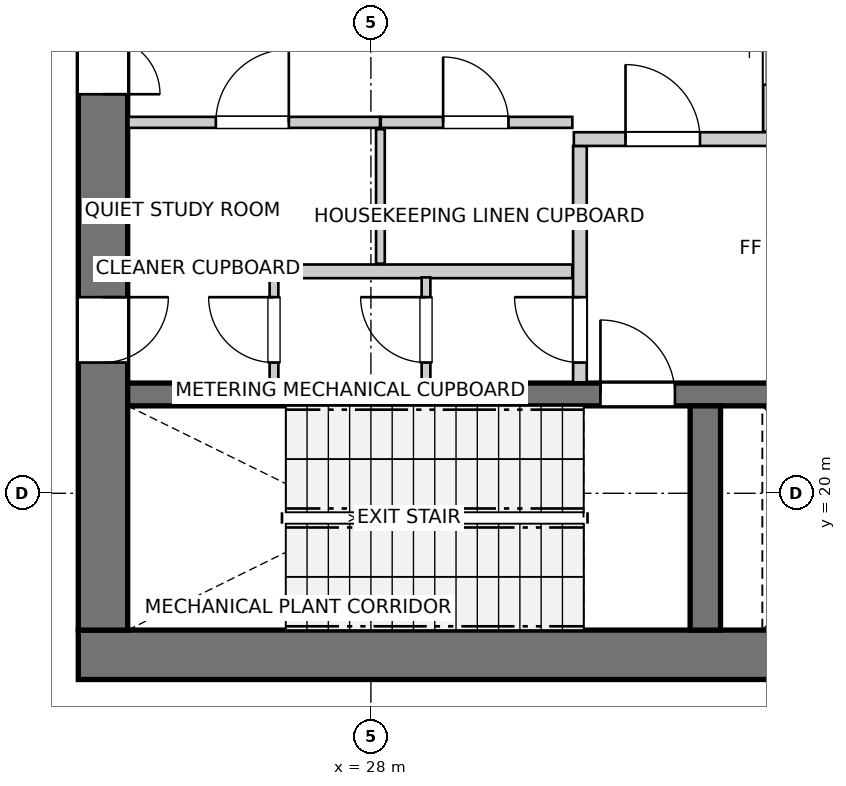
"""IFC4 building model, lengths in metres.
Left out: names, types, materials, properties, quantities, classifications, styles, units other than length and angle.
Written with IfcOpenShell. Run it as: python <this file> out.ifc"""

import sys

from ifc_helpers import new_model, si_unit, direction, frame, frame_2d, origin, place, context, subcontext, project, spatial, rectangle, extrude, source, transform, mapped, element, fill, save


model = new_model("IFC4")
c1 = context("Model", 3, precision=1e-05, world=origin(), true_north=direction((0.0, 1.0)))
c2 = subcontext(c1, "Body", "Model", "MODEL_VIEW")
j1 = project(units=[si_unit("LENGTHUNIT", "METRE"), si_unit("PLANEANGLEUNIT", "RADIAN")], contexts=[c1])
p1 = place(None, origin())
s1 = spatial("IfcSite", under=j1, at=p1, CompositionType="ELEMENT")
p2 = place(p1, origin())
s2 = spatial("IfcBuilding", under=s1, at=p2, CompositionType="ELEMENT")
p3 = place(p2, frame((0.0, 0.0, 190.6)))
s3 = spatial("IfcBuildingStorey", under=s2, at=p3, CompositionType="ELEMENT", Elevation=190.6)
p4 = place(p3, frame((24.15, 17.875, 0.0), z_axis=(0.0, 0.0, 1.0), x_axis=(1.0, 0.0, 0.0)))
e1 = element("IfcWall", 1, at=p4, inside=s3, PredefinedType="SHEAR", context=c2, shape_type="SweptSolid", body=[
    extrude(rectangle(XDim=12.4, YDim=0.65, at=frame_2d((6.2, 0.0))), origin(), (0.0, 0.0, 1.0), 4.76),
])
p5 = place(p3, frame((24.475, 33.8, 0.0), z_axis=(0.0, 0.0, 1.0), x_axis=(0.0, -1.0, 0.0)))
e2 = element("IfcWall", 2, at=p5, inside=s3, PredefinedType="SHEAR", context=c2, shape_type="SweptSolid", body=[
    extrude(rectangle(XDim=15.6, YDim=0.65, at=frame_2d((7.8, 0.0))), origin(), (0.0, 0.0, 1.0), 4.76),
])
p6 = place(p5, frame((7.05, 0.0, 0.0)))
e3 = element("IfcOpeningElement", 3, at=p6, cuts=e2, PredefinedType="OPENING", context=c2, shape_type="SweptSolid", body=[
    extrude(rectangle(XDim=1.5, YDim=2.15, at=frame_2d((0.75, 1.075))), frame((0.0, 0.335, 0.0), z_axis=(0.0, -1.0, 0.0), x_axis=(1.0, 0.0, 0.0)), (0.0, 0.0, 1.0), 0.67),
])
p7 = place(p5, frame((3.52, 0.0, 0.0)))
e4 = element("IfcOpeningElement", 4, at=p7, cuts=e2, PredefinedType="OPENING", context=c2, shape_type="SweptSolid", body=[
    extrude(rectangle(XDim=0.86, YDim=2.05, at=frame_2d((0.43, 1.025))), frame((0.0, 0.335, 0.0), z_axis=(0.0, -1.0, 0.0), x_axis=(1.0, 0.0, 0.0)), (0.0, 0.0, 1.0), 0.67),
])
p8 = place(p5, frame((11.22, 0.0, 0.0)))
e5 = element("IfcOpeningElement", 5, at=p8, cuts=e2, PredefinedType="OPENING", context=c2, shape_type="SweptSolid", body=[
    extrude(rectangle(XDim=0.86, YDim=2.05, at=frame_2d((0.43, 1.025))), frame((0.0, 0.335, 0.0), z_axis=(0.0, -1.0, 0.0), x_axis=(1.0, 0.0, 0.0)), (0.0, 0.0, 1.0), 0.67),
])
p9 = place(p3, frame((24.8, 21.3, 0.0), z_axis=(0.0, 0.0, 1.0), x_axis=(1.0, 0.0, 0.0)))
e6 = element("IfcWall", 6, at=p9, inside=s3, PredefinedType="SHEAR", context=c2, shape_type="SweptSolid", body=[
    extrude(rectangle(XDim=11.1, YDim=0.3, at=frame_2d((5.55, 0.0))), origin(), (0.0, 0.0, 1.0), 4.76),
])
p10 = place(p9, frame((6.22, 0.0, 0.0)))
e7 = element("IfcOpeningElement", 7, at=p10, cuts=e6, PredefinedType="OPENING", context=c2, shape_type="SweptSolid", body=[
    extrude(rectangle(XDim=0.98, YDim=2.15, at=frame_2d((0.49, 1.075))), frame((0.0, 0.16, 0.0), z_axis=(0.0, -1.0, 0.0), x_axis=(1.0, 0.0, 0.0)), (0.0, 0.0, 1.0), 0.32),
])
p11 = place(p9, frame((9.15, 0.0, 0.0)))
e8 = element("IfcOpeningElement", 8, at=p11, cuts=e6, PredefinedType="OPENING", context=c2, shape_type="SweptSolid", body=[
    extrude(rectangle(XDim=1.15, YDim=2.15, at=frame_2d((0.575, 1.075))), frame((0.0, 0.16, 0.0), z_axis=(0.0, -1.0, 0.0), x_axis=(1.0, 0.0, 0.0)), (0.0, 0.0, 1.0), 0.32),
])
p12 = place(p3, frame((32.4, 18.2, 0.0), z_axis=(0.0, 0.0, 1.0), x_axis=(0.0, 1.0, 0.0)))
e9 = element("IfcWall", 9, at=p12, inside=s3, PredefinedType="SHEAR", context=c2, shape_type="SweptSolid", body=[
    extrude(rectangle(XDim=2.95, YDim=0.4, at=frame_2d((1.475, 0.0))), origin(), (0.0, 0.0, 1.0), 4.76),
])
p13 = place(p3, frame((30.75, 21.46, 0.0), z_axis=(0.0, 0.0, 1.0), x_axis=(0.0, 1.0, 0.0)))
e10 = element("IfcWall", 10, at=p13, inside=s3, PredefinedType="PARTITIONING", context=c2, shape_type="SweptSolid", body=[
    extrude(rectangle(XDim=3.11, YDim=0.18, at=frame_2d((1.555, 0.0))), origin(), (0.0, 0.0, 1.0), 4.76),
])
p14 = place(p13, frame((0.26, 0.0, 0.0)))
e11 = element("IfcOpeningElement", 11, at=p14, cuts=e10, PredefinedType="OPENING", context=c2, shape_type="SweptSolid", body=[
    extrude(rectangle(XDim=0.86, YDim=2.05, at=frame_2d((0.43, 1.025))), frame((0.0, 0.1, 0.0), z_axis=(0.0, -1.0, 0.0), x_axis=(1.0, 0.0, 0.0)), (0.0, 0.0, 1.0), 0.2),
])
p15 = place(p3, frame((30.67, 24.66, 0.0), z_axis=(0.0, 0.0, 1.0), x_axis=(1.0, 0.0, 0.0)))
e12 = element("IfcWall", 12, at=p15, inside=s3, PredefinedType="PARTITIONING", context=c2, shape_type="SweptSolid", body=[
    extrude(rectangle(XDim=5.22, YDim=0.18, at=frame_2d((2.61, 0.0))), origin(), (0.0, 0.0, 1.0), 4.76),
])
p16 = place(p15, frame((0.68, 0.0, 0.0)))
e13 = element("IfcOpeningElement", 13, at=p16, cuts=e12, PredefinedType="OPENING", context=c2, shape_type="SweptSolid", body=[
    extrude(rectangle(XDim=0.98, YDim=2.15, at=frame_2d((0.49, 1.075))), frame((0.0, 0.1, 0.0), z_axis=(0.0, -1.0, 0.0), x_axis=(1.0, 0.0, 0.0)), (0.0, 0.0, 1.0), 0.2),
])
p17 = place(p3, frame((33.25, 24.76, 0.0), z_axis=(0.0, 0.0, 1.0), x_axis=(0.0, 1.0, 0.0)))
e14 = element("IfcWall", 14, at=p17, inside=s3, PredefinedType="PARTITIONING", context=c2, shape_type="SweptSolid", body=[
    extrude(rectangle(XDim=2.48, YDim=0.18, at=frame_2d((1.24, 0.0))), origin(), (0.0, 0.0, 1.0), 4.76),
])
p18 = place(p17, frame((0.615, 0.0, 0.0)))
e15 = element("IfcOpeningElement", 15, at=p18, cuts=e14, PredefinedType="OPENING", context=c2, shape_type="SweptSolid", body=[
    extrude(rectangle(XDim=1.25, YDim=2.15, at=frame_2d((0.625, 1.075))), frame((0.0, 0.1, 0.0), z_axis=(0.0, -1.0, 0.0), x_axis=(1.0, 0.0, 0.0)), (0.0, 0.0, 1.0), 0.2),
])
p19 = place(p3, frame((24.81, 22.92, 0.0), z_axis=(0.0, 0.0, 1.0), x_axis=(1.0, 0.0, 0.0)))
e16 = element("IfcWall", 16, at=p19, inside=s3, PredefinedType="PARTITIONING", context=c2, shape_type="SweptSolid", body=[
    extrude(rectangle(XDim=5.84, YDim=0.18, at=frame_2d((2.92, 0.0))), origin(), (0.0, 0.0, 1.0), 4.76),
])
p20 = place(p3, frame((24.81, 24.88, 0.0), z_axis=(0.0, 0.0, 1.0), x_axis=(1.0, 0.0, 0.0)))
e17 = element("IfcWall", 17, at=p20, inside=s3, PredefinedType="PARTITIONING", context=c2, shape_type="SweptSolid", body=[
    extrude(rectangle(XDim=3.31, YDim=0.145, at=frame_2d((1.655, 0.0))), origin(), (0.0, 0.0, 1.0), 4.76),
])
p21 = place(p20, frame((1.15, 0.0, 0.0)))
e18 = element("IfcOpeningElement", 18, at=p21, cuts=e17, PredefinedType="OPENING", context=c2, shape_type="SweptSolid", body=[
    extrude(rectangle(XDim=0.96, YDim=2.1, at=frame_2d((0.48, 1.05))), frame((0.0, 0.083, 0.0), z_axis=(0.0, -1.0, 0.0), x_axis=(1.0, 0.0, 0.0)), (0.0, 0.0, 1.0), 0.165),
])
p22 = place(p3, frame((28.13, 24.88, 0.0), z_axis=(0.0, 0.0, 1.0), x_axis=(1.0, 0.0, 0.0)))
e19 = element("IfcWall", 19, at=p22, inside=s3, PredefinedType="PARTITIONING", context=c2, shape_type="SweptSolid", body=[
    extrude(rectangle(XDim=2.52, YDim=0.145, at=frame_2d((1.26, 0.0))), origin(), (0.0, 0.0, 1.0), 4.76),
])
p23 = place(p22, frame((0.82, 0.0, 0.0)))
e20 = element("IfcOpeningElement", 20, at=p23, cuts=e19, PredefinedType="OPENING", context=c2, shape_type="SweptSolid", body=[
    extrude(rectangle(XDim=0.86, YDim=2.05, at=frame_2d((0.43, 1.025))), frame((0.0, 0.083, 0.0), z_axis=(0.0, -1.0, 0.0), x_axis=(1.0, 0.0, 0.0)), (0.0, 0.0, 1.0), 0.165),
])
p24 = place(p3, frame((28.125, 23.02, 0.0), z_axis=(0.0, 0.0, 1.0), x_axis=(0.0, 1.0, 0.0)))
e21 = element("IfcWall", 21, at=p24, inside=s3, PredefinedType="PARTITIONING", context=c2, shape_type="SweptSolid", body=[
    extrude(rectangle(XDim=1.77, YDim=0.115, at=frame_2d((0.885, 0.0))), origin(), (0.0, 0.0, 1.0), 4.76),
])
p25 = place(p3, frame((26.725, 21.46, 0.0), z_axis=(0.0, 0.0, 1.0), x_axis=(0.0, 1.0, 0.0)))
e22 = element("IfcWall", 22, at=p25, inside=s3, PredefinedType="PARTITIONING", context=c2, shape_type="SweptSolid", body=[
    extrude(rectangle(XDim=1.38, YDim=0.115, at=frame_2d((0.69, 0.0))), origin(), (0.0, 0.0, 1.0), 4.76),
])
p26 = place(p25, frame((0.26, 0.0, 0.0)))
e23 = element("IfcOpeningElement", 23, at=p26, cuts=e22, PredefinedType="OPENING", context=c2, shape_type="SweptSolid", body=[
    extrude(rectangle(XDim=0.86, YDim=2.05, at=frame_2d((0.43, 1.025))), frame((0.0, 0.067, 0.0), z_axis=(0.0, -1.0, 0.0), x_axis=(1.0, 0.0, 0.0)), (0.0, 0.0, 1.0), 0.135),
])
p27 = place(p3, frame((28.725, 21.46, 0.0), z_axis=(0.0, 0.0, 1.0), x_axis=(0.0, 1.0, 0.0)))
e24 = element("IfcWall", 24, at=p27, inside=s3, PredefinedType="PARTITIONING", context=c2, shape_type="SweptSolid", body=[
    extrude(rectangle(XDim=1.38, YDim=0.115, at=frame_2d((0.69, 0.0))), origin(), (0.0, 0.0, 1.0), 4.76),
])
p28 = place(p27, frame((0.26, 0.0, 0.0)))
e25 = element("IfcOpeningElement", 25, at=p28, cuts=e24, PredefinedType="OPENING", context=c2, shape_type="SweptSolid", body=[
    extrude(rectangle(XDim=0.86, YDim=2.05, at=frame_2d((0.43, 1.025))), frame((0.0, 0.067, 0.0), z_axis=(0.0, -1.0, 0.0), x_axis=(1.0, 0.0, 0.0)), (0.0, 0.0, 1.0), 0.135),
])
m1 = source(origin(), c2, "Body", "SweptSolid", [
    extrude(rectangle(XDim=0.98, YDim=2.15, at=frame_2d((0.49, 1.075))), frame((0.0, 0.025, 0.0), z_axis=(0.0, -1.0, 0.0), x_axis=(1.0, 0.0, 0.0)), (0.0, 0.0, 1.0), 0.05),
])
p29 = place(p10, origin())
e26 = element("IfcDoor", 26, at=p29, inside=s3, OperationType="SINGLE_SWING_LEFT", PredefinedType="DOOR", context=c2, shape_type="MappedRepresentation", body=[
    mapped(m1, transform((0.0, 0.0, 0.0), x_axis=(1.0, 0.0, 0.0), y_axis=(0.0, 1.0, 0.0), z_axis=(0.0, 0.0, 1.0), scale=1.0)),
])
fill(e7, e26)
m2 = source(origin(), c2, "Body", "SweptSolid", [
    extrude(rectangle(XDim=1.5, YDim=2.15, at=frame_2d((0.75, 1.075))), frame((0.0, 0.025, 0.0), z_axis=(0.0, -1.0, 0.0), x_axis=(1.0, 0.0, 0.0)), (0.0, 0.0, 1.0), 0.05),
])
p30 = place(p6, origin())
e27 = element("IfcDoor", 27, at=p30, inside=s3, OperationType="DOUBLE_DOOR_SINGLE_SWING", PredefinedType="DOOR", context=c2, shape_type="MappedRepresentation", body=[
    mapped(m2, transform((0.0, 0.0, 0.0), x_axis=(1.0, 0.0, 0.0), y_axis=(0.0, 1.0, 0.0), z_axis=(0.0, 0.0, 1.0), scale=1.0)),
])
fill(e3, e27)
m3 = source(origin(), c2, "Body", "SweptSolid", [
    extrude(rectangle(XDim=0.86, YDim=2.05, at=frame_2d((0.43, 1.025))), frame((0.0, 0.025, 0.0), z_axis=(0.0, -1.0, 0.0), x_axis=(1.0, 0.0, 0.0)), (0.0, 0.0, 1.0), 0.05),
])
p31 = place(p8, origin())
e28 = element("IfcDoor", 28, at=p31, inside=s3, OperationType="SINGLE_SWING_LEFT", PredefinedType="DOOR", context=c2, shape_type="MappedRepresentation", body=[
    mapped(m3, transform((0.0, 0.0, 0.0), x_axis=(1.0, 0.0, 0.0), y_axis=(0.0, 1.0, 0.0), z_axis=(0.0, 0.0, 1.0), scale=1.0)),
])
fill(e5, e28)
p32 = place(p14, origin())
e29 = element("IfcDoor", 29, at=p32, inside=s3, OperationType="SINGLE_SWING_RIGHT", PredefinedType="DOOR", context=c2, shape_type="MappedRepresentation", body=[
    mapped(m3, transform((0.0, 0.0, 0.0), x_axis=(1.0, 0.0, 0.0), y_axis=(0.0, 1.0, 0.0), z_axis=(0.0, 0.0, 1.0), scale=1.0)),
])
fill(e11, e29)
p33 = place(p16, origin())
e30 = element("IfcDoor", 30, at=p33, inside=s3, OperationType="SINGLE_SWING_LEFT", PredefinedType="DOOR", context=c2, shape_type="MappedRepresentation", body=[
    mapped(m1, transform((0.0, 0.0, 0.0), x_axis=(1.0, 0.0, 0.0), y_axis=(0.0, 1.0, 0.0), z_axis=(0.0, 0.0, 1.0), scale=1.0)),
])
fill(e13, e30)
m4 = source(origin(), c2, "Body", "SweptSolid", [
    extrude(rectangle(XDim=0.96, YDim=2.1, at=frame_2d((0.48, 1.05))), frame((0.0, 0.025, 0.0), z_axis=(0.0, -1.0, 0.0), x_axis=(1.0, 0.0, 0.0)), (0.0, 0.0, 1.0), 0.05),
])
p34 = place(p21, origin())
e31 = element("IfcDoor", 31, at=p34, inside=s3, OperationType="SINGLE_SWING_RIGHT", PredefinedType="DOOR", context=c2, shape_type="MappedRepresentation", body=[
    mapped(m4, transform((0.0, 0.0, 0.0), x_axis=(1.0, 0.0, 0.0), y_axis=(0.0, 1.0, 0.0), z_axis=(0.0, 0.0, 1.0), scale=1.0)),
])
fill(e18, e31)
p35 = place(p23, origin())
e32 = element("IfcDoor", 32, at=p35, inside=s3, OperationType="SINGLE_SWING_LEFT", PredefinedType="DOOR", context=c2, shape_type="MappedRepresentation", body=[
    mapped(m3, transform((0.0, 0.0, 0.0), x_axis=(1.0, 0.0, 0.0), y_axis=(0.0, 1.0, 0.0), z_axis=(0.0, 0.0, 1.0), scale=1.0)),
])
fill(e20, e32)
p36 = place(p26, origin())
e33 = element("IfcDoor", 33, at=p36, inside=s3, OperationType="SINGLE_SWING_RIGHT", PredefinedType="DOOR", context=c2, shape_type="MappedRepresentation", body=[
    mapped(m3, transform((0.0, 0.0, 0.0), x_axis=(1.0, 0.0, 0.0), y_axis=(0.0, 1.0, 0.0), z_axis=(0.0, 0.0, 1.0), scale=1.0)),
])
fill(e23, e33)
p37 = place(p28, origin())
e34 = element("IfcDoor", 34, at=p37, inside=s3, OperationType="SINGLE_SWING_RIGHT", PredefinedType="DOOR", context=c2, shape_type="MappedRepresentation", body=[
    mapped(m3, transform((0.0, 0.0, 0.0), x_axis=(1.0, 0.0, 0.0), y_axis=(0.0, 1.0, 0.0), z_axis=(0.0, 0.0, 1.0), scale=1.0)),
])
fill(e25, e34)
save(model, sys.argv[1])
